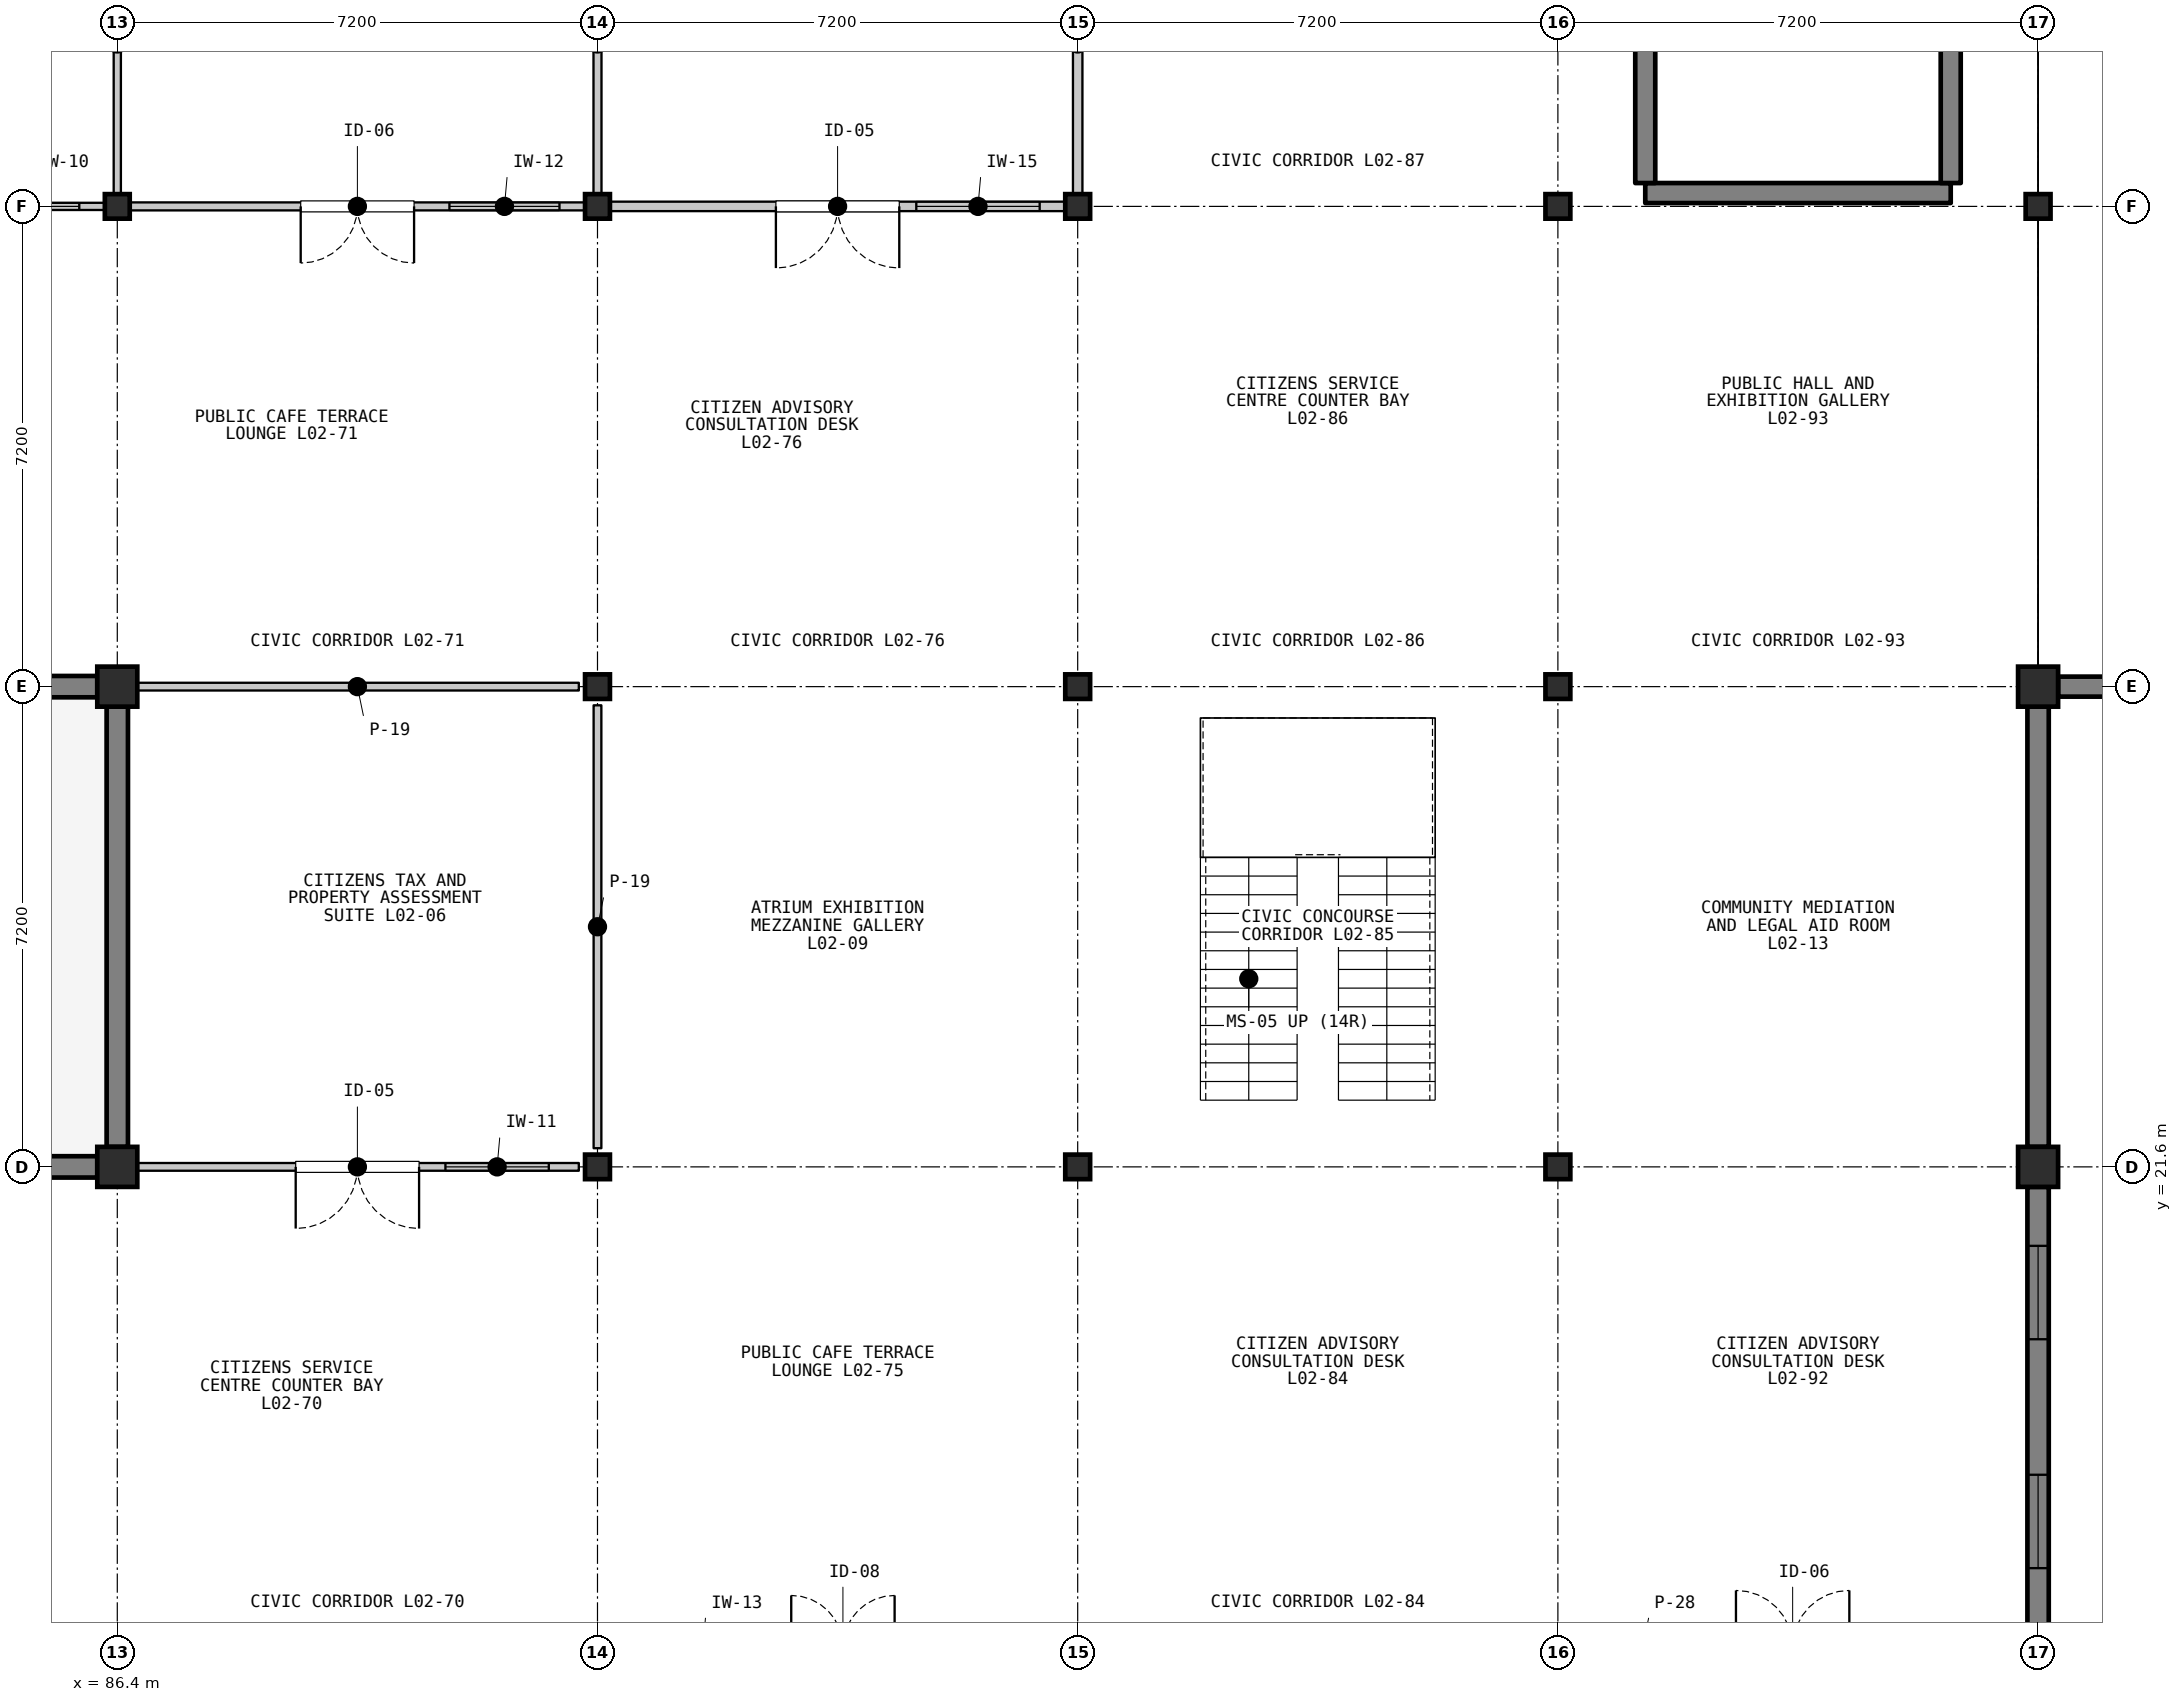
"""IFC4 building model, lengths in metres.
Left out: names, types, materials, properties, quantities, classifications, styles, units other than length and angle.
Written with IfcOpenShell. Run it as: python <this file> out.ifc"""

import sys

from ifc_helpers import new_model, si_unit, direction, frame, frame_2d, origin, origin_2d, place, context, subcontext, project, spatial, rectangle, i_section, extrude, element, fill, save


model = new_model("IFC4")
c1 = context("Model", 3, precision=1e-05, world=origin(), true_north=direction((0.0, 1.0)))
c2 = subcontext(c1, "Body", "Model", "MODEL_VIEW")
j1 = project(units=[si_unit("LENGTHUNIT", "METRE"), si_unit("PLANEANGLEUNIT", "RADIAN")], contexts=[c1])
p1 = place(None, origin())
s1 = spatial("IfcSite", under=j1, at=p1, CompositionType="ELEMENT")
p2 = place(p1, origin())
s2 = spatial("IfcBuilding", under=s1, at=p2, CompositionType="ELEMENT")
p3 = place(p2, frame((0.0, 0.0, 5.4)))
s3 = spatial("IfcBuildingStorey", under=s2, at=p3, CompositionType="ELEMENT", Elevation=5.4)
for number, where, z_axis, x_axis in (
    (1, (86.4, 21.6, 0.0), (0.0, 0.0, 1.0), (1.0, 0.0, 0.0)),
    (2, (86.4, 28.8, 0.0), (0.0, 0.0, 1.0), (1.0, 0.0, 0.0)),
):
    element("IfcColumn", number, at=place(p3, frame(where, z_axis=z_axis, x_axis=x_axis)), inside=s3, PredefinedType="COLUMN", context=c2, shape_type="SweptSolid", body=[
        extrude(rectangle(XDim=0.6, YDim=0.6, at=origin_2d()), origin(), (0.0, 0.0, 1.0), 4.5),
    ])
for number, where, z_axis, x_axis in (
    (3, (86.4, 36.0, 0.0), (0.0, 0.0, 1.0), (1.0, 0.0, 0.0)),
    (4, (93.6, 21.6, 0.0), (0.0, 0.0, 1.0), (1.0, 0.0, 0.0)),
    (5, (93.6, 28.8, 0.0), (0.0, 0.0, 1.0), (1.0, 0.0, 0.0)),
    (6, (93.6, 36.0, 0.0), (0.0, 0.0, 1.0), (1.0, 0.0, 0.0)),
    (7, (100.8, 21.6, 0.0), (0.0, 0.0, 1.0), (1.0, 0.0, 0.0)),
    (8, (100.8, 28.8, 0.0), (0.0, 0.0, 1.0), (1.0, 0.0, 0.0)),
    (9, (100.8, 36.0, 0.0), (0.0, 0.0, 1.0), (1.0, 0.0, 0.0)),
    (10, (108.0, 21.6, 0.0), (0.0, 0.0, 1.0), (1.0, 0.0, 0.0)),
    (11, (108.0, 28.8, 0.0), (0.0, 0.0, 1.0), (1.0, 0.0, 0.0)),
    (12, (108.0, 36.0, 0.0), (0.0, 0.0, 1.0), (1.0, 0.0, 0.0)),
):
    element("IfcColumn", number, at=place(p3, frame(where, z_axis=z_axis, x_axis=x_axis)), inside=s3, PredefinedType="COLUMN", context=c2, shape_type="SweptSolid", body=[
        extrude(i_section(OverallWidth=0.373, OverallDepth=0.368, WebThickness=0.015, FlangeThickness=0.024, FilletRadius=0.015, at=origin_2d()), origin(), (0.0, 0.0, 1.0), 4.5),
    ])
for number, where, z_axis, x_axis in (
    (13, (115.2, 21.6, 0.0), (0.0, 0.0, 1.0), (1.0, 0.0, 0.0)),
    (14, (115.2, 28.8, 0.0), (0.0, 0.0, 1.0), (1.0, 0.0, 0.0)),
):
    element("IfcColumn", number, at=place(p3, frame(where, z_axis=z_axis, x_axis=x_axis)), inside=s3, PredefinedType="COLUMN", context=c2, shape_type="SweptSolid", body=[
        extrude(rectangle(XDim=0.6, YDim=0.6, at=origin_2d()), origin(), (0.0, 0.0, 1.0), 4.5),
    ])
p4 = place(p3, frame((115.2, 36.0, 0.0), z_axis=(0.0, 0.0, 1.0), x_axis=(1.0, 0.0, 0.0)))
e15 = element("IfcColumn", 15, at=p4, inside=s3, PredefinedType="COLUMN", context=c2, shape_type="SweptSolid", body=[
    extrude(i_section(OverallWidth=0.373, OverallDepth=0.368, WebThickness=0.015, FlangeThickness=0.024, FilletRadius=0.015, at=origin_2d()), origin(), (0.0, 0.0, 1.0), 4.5),
])
for number, where, z_axis, x_axis in (
    (16, (79.5, 21.6, 0.0), (0.0, 0.0, 1.0), (1.0, 0.0, 0.0)),
    (17, (86.1, 28.8, 0.0), (0.0, 0.0, 1.0), (-1.0, 0.0, 0.0)),
):
    element("IfcWall", number, at=place(p3, frame(where, z_axis=z_axis, x_axis=x_axis)), inside=s3, PredefinedType="SOLIDWALL", context=c2, shape_type="SweptSolid", body=[
        extrude(rectangle(XDim=6.6, YDim=0.32, at=frame_2d((3.3, 0.0))), origin(), (0.0, 0.0, 1.0), 3.698),
    ])
p5 = place(p3, frame((86.4, 21.9, 0.0), z_axis=(0.0, 0.0, 1.0), x_axis=(0.0, 1.0, 0.0)))
e18 = element("IfcWall", 18, at=p5, inside=s3, PredefinedType="SOLIDWALL", context=c2, shape_type="SweptSolid", body=[
    extrude(rectangle(XDim=6.6, YDim=0.32, at=frame_2d((3.3, 0.0))), origin(), (0.0, 0.0, 1.0), 3.767),
])
p6 = place(p3, frame((115.2, 21.3, 0.0), z_axis=(0.0, 0.0, 1.0), x_axis=(0.0, -1.0, 0.0)))
e19 = element("IfcWall", 19, at=p6, inside=s3, PredefinedType="SOLIDWALL", context=c2, shape_type="SweptSolid", body=[
    extrude(rectangle(XDim=6.6, YDim=0.32, at=frame_2d((3.3, 0.0))), origin(), (0.0, 0.0, 1.0), 3.767),
])
p7 = place(p6, frame((0.884, 0.0, 0.95)))
e20 = element("IfcOpeningElement", 20, at=p7, cuts=e19, PredefinedType="OPENING", context=c2, shape_type="SweptSolid", body=[
    extrude(rectangle(XDim=1.4, YDim=2.1, at=frame_2d((0.7, 1.05))), frame((0.0, 0.17, 0.0), z_axis=(0.0, -1.0, 0.0), x_axis=(1.0, 0.0, 0.0)), (0.0, 0.0, 1.0), 0.34),
])
p8 = place(p6, frame((4.316, 0.0, 0.95)))
e21 = element("IfcOpeningElement", 21, at=p8, cuts=e19, PredefinedType="OPENING", context=c2, shape_type="SweptSolid", body=[
    extrude(rectangle(XDim=1.4, YDim=2.1, at=frame_2d((0.7, 1.05))), frame((0.0, 0.17, 0.0), z_axis=(0.0, -1.0, 0.0), x_axis=(1.0, 0.0, 0.0)), (0.0, 0.0, 1.0), 0.34),
])
p9 = place(p3, frame((115.2, 28.5, 0.0), z_axis=(0.0, 0.0, 1.0), x_axis=(0.0, -1.0, 0.0)))
e22 = element("IfcWall", 22, at=p9, inside=s3, PredefinedType="SOLIDWALL", context=c2, shape_type="SweptSolid", body=[
    extrude(rectangle(XDim=6.6, YDim=0.32, at=frame_2d((3.3, 0.0))), origin(), (0.0, 0.0, 1.0), 3.767),
])
p10 = place(p3, frame((122.15, 28.8, 0.0), z_axis=(0.0, 0.0, 1.0), x_axis=(-1.0, 0.0, 0.0)))
e23 = element("IfcWall", 23, at=p10, inside=s3, PredefinedType="SOLIDWALL", context=c2, shape_type="SweptSolid", body=[
    extrude(rectangle(XDim=6.65, YDim=0.3, at=frame_2d((3.325, 0.0))), origin(), (0.0, 0.0, 1.0), 3.698),
])
p11 = place(p10, frame((2.1, 0.0, 0.95)))
e24 = element("IfcOpeningElement", 24, at=p11, cuts=e23, PredefinedType="OPENING", context=c2, shape_type="SweptSolid", body=[
    extrude(rectangle(XDim=2.45, YDim=2.05, at=frame_2d((1.225, 1.025))), frame((0.0, 0.16, 0.0), z_axis=(0.0, -1.0, 0.0), x_axis=(1.0, 0.0, 0.0)), (0.0, 0.0, 1.0), 0.32),
])
p12 = place(p3, frame((109.31, 36.2, 0.0), z_axis=(0.0, 0.0, 1.0), x_axis=(1.0, 0.0, 0.0)))
e25 = element("IfcWall", 25, at=p12, inside=s3, PredefinedType="SHEAR", context=c2, shape_type="SweptSolid", body=[
    extrude(rectangle(XDim=4.58, YDim=0.3, at=frame_2d((2.29, 0.0))), origin(), (0.0, 0.0, 1.0), 4.3),
])
for number, where, z_axis, x_axis in (
    (26, (109.31, 36.35, 0.0), (0.0, 0.0, 1.0), (0.0, 1.0, 0.0)),
    (27, (113.89, 36.35, 0.0), (0.0, 0.0, 1.0), (0.0, 1.0, 0.0)),
):
    element("IfcWall", number, at=place(p3, frame(where, z_axis=z_axis, x_axis=x_axis)), inside=s3, PredefinedType="SHEAR", context=c2, shape_type="SweptSolid", body=[
        extrude(rectangle(XDim=9.3, YDim=0.3, at=frame_2d((4.65, 0.0))), origin(), (0.0, 0.0, 1.0), 4.3),
    ])
p13 = place(p3, frame((86.28, 36.0, 0.0), z_axis=(0.0, 0.0, 1.0), x_axis=(-1.0, 0.0, 0.0)))
e28 = element("IfcWall", 28, at=p13, inside=s3, PredefinedType="PARTITIONING", context=c2, shape_type="SweptSolid", body=[
    extrude(rectangle(XDim=6.96, YDim=0.108, at=frame_2d((3.48, 0.0))), origin(), (0.0, 0.0, 1.0), 3.688),
])
p14 = place(p13, frame((2.63, 0.0, 0.0)))
e29 = element("IfcOpeningElement", 29, at=p14, cuts=e28, PredefinedType="OPENING", context=c2, shape_type="SweptSolid", body=[
    extrude(rectangle(XDim=1.7, YDim=2.35, at=frame_2d((0.85, 1.175))), frame((0.0, 0.064, 0.0), z_axis=(0.0, -1.0, 0.0), x_axis=(1.0, 0.0, 0.0)), (0.0, 0.0, 1.0), 0.128),
])
p15 = place(p13, frame((0.45, 0.0, 1.05)))
e30 = element("IfcOpeningElement", 30, at=p15, cuts=e28, PredefinedType="OPENING", context=c2, shape_type="SweptSolid", body=[
    extrude(rectangle(XDim=1.5, YDim=1.15, at=frame_2d((0.75, 0.575))), frame((0.0, 0.064, 0.0), z_axis=(0.0, -1.0, 0.0), x_axis=(1.0, 0.0, 0.0)), (0.0, 0.0, 1.0), 0.128),
])
p16 = place(p3, frame((86.4, 42.92, 0.0), z_axis=(0.0, 0.0, 1.0), x_axis=(0.0, -1.0, 0.0)))
e31 = element("IfcWall", 31, at=p16, inside=s3, PredefinedType="PARTITIONING", context=c2, shape_type="SweptSolid", body=[
    extrude(rectangle(XDim=6.8, YDim=0.108, at=frame_2d((3.4, 0.0))), origin(), (0.0, 0.0, 1.0), 3.688),
])
p17 = place(p3, frame((93.32, 21.6, 0.0), z_axis=(0.0, 0.0, 1.0), x_axis=(-1.0, 0.0, 0.0)))
e32 = element("IfcWall", 32, at=p17, inside=s3, PredefinedType="PARTITIONING", context=c2, shape_type="SweptSolid", body=[
    extrude(rectangle(XDim=6.64, YDim=0.116, at=frame_2d((3.32, 0.0))), origin(), (0.0, 0.0, 1.0), 3.688),
])
p18 = place(p17, frame((2.395, 0.0, 0.0)))
e33 = element("IfcOpeningElement", 33, at=p18, cuts=e32, PredefinedType="OPENING", context=c2, shape_type="SweptSolid", body=[
    extrude(rectangle(XDim=1.85, YDim=2.45, at=frame_2d((0.925, 1.225))), frame((0.0, 0.068, 0.0), z_axis=(0.0, -1.0, 0.0), x_axis=(1.0, 0.0, 0.0)), (0.0, 0.0, 1.0), 0.136),
])
p19 = place(p17, frame((0.45, 0.0, 1.05)))
e34 = element("IfcOpeningElement", 34, at=p19, cuts=e32, PredefinedType="OPENING", context=c2, shape_type="SweptSolid", body=[
    extrude(rectangle(XDim=1.55, YDim=1.15, at=frame_2d((0.775, 0.575))), frame((0.0, 0.068, 0.0), z_axis=(0.0, -1.0, 0.0), x_axis=(1.0, 0.0, 0.0)), (0.0, 0.0, 1.0), 0.136),
])
p20 = place(p3, frame((86.68, 28.8, 0.0), z_axis=(0.0, 0.0, 1.0), x_axis=(1.0, 0.0, 0.0)))
e35 = element("IfcWall", 35, at=p20, inside=s3, PredefinedType="PARTITIONING", context=c2, shape_type="SweptSolid", body=[
    extrude(rectangle(XDim=6.64, YDim=0.116, at=frame_2d((3.32, 0.0))), origin(), (0.0, 0.0, 1.0), 3.688),
])
p21 = place(p3, frame((93.6, 28.52, 0.0), z_axis=(0.0, 0.0, 1.0), x_axis=(0.0, -1.0, 0.0)))
e36 = element("IfcWall", 36, at=p21, inside=s3, PredefinedType="PARTITIONING", context=c2, shape_type="SweptSolid", body=[
    extrude(rectangle(XDim=6.64, YDim=0.116, at=frame_2d((3.32, 0.0))), origin(), (0.0, 0.0, 1.0), 3.757),
])
p22 = place(p3, frame((93.48, 36.0, 0.0), z_axis=(0.0, 0.0, 1.0), x_axis=(-1.0, 0.0, 0.0)))
e37 = element("IfcWall", 37, at=p22, inside=s3, PredefinedType="PARTITIONING", context=c2, shape_type="SweptSolid", body=[
    extrude(rectangle(XDim=6.96, YDim=0.12, at=frame_2d((3.48, 0.0))), origin(), (0.0, 0.0, 1.0), 3.688),
])
p23 = place(p22, frame((2.63, 0.0, 0.0)))
e38 = element("IfcOpeningElement", 38, at=p23, cuts=e37, PredefinedType="OPENING", context=c2, shape_type="SweptSolid", body=[
    extrude(rectangle(XDim=1.7, YDim=2.35, at=frame_2d((0.85, 1.175))), frame((0.0, 0.07, 0.0), z_axis=(0.0, -1.0, 0.0), x_axis=(1.0, 0.0, 0.0)), (0.0, 0.0, 1.0), 0.14),
])
p24 = place(p22, frame((0.45, 0.0, 1.05)))
e39 = element("IfcOpeningElement", 39, at=p24, cuts=e37, PredefinedType="OPENING", context=c2, shape_type="SweptSolid", body=[
    extrude(rectangle(XDim=1.65, YDim=1.15, at=frame_2d((0.825, 0.575))), frame((0.0, 0.07, 0.0), z_axis=(0.0, -1.0, 0.0), x_axis=(1.0, 0.0, 0.0)), (0.0, 0.0, 1.0), 0.14),
])
p25 = place(p3, frame((93.6, 42.92, 0.0), z_axis=(0.0, 0.0, 1.0), x_axis=(0.0, -1.0, 0.0)))
e40 = element("IfcWall", 40, at=p25, inside=s3, PredefinedType="PARTITIONING", context=c2, shape_type="SweptSolid", body=[
    extrude(rectangle(XDim=6.8, YDim=0.12, at=frame_2d((3.4, 0.0))), origin(), (0.0, 0.0, 1.0), 3.688),
])
p26 = place(p3, frame((100.68, 36.0, 0.0), z_axis=(0.0, 0.0, 1.0), x_axis=(-1.0, 0.0, 0.0)))
e41 = element("IfcWall", 41, at=p26, inside=s3, PredefinedType="PARTITIONING", context=c2, shape_type="SweptSolid", body=[
    extrude(rectangle(XDim=6.96, YDim=0.142, at=frame_2d((3.48, 0.0))), origin(), (0.0, 0.0, 1.0), 3.688),
])
p27 = place(p26, frame((2.555, 0.0, 0.0)))
e42 = element("IfcOpeningElement", 42, at=p27, cuts=e41, PredefinedType="OPENING", context=c2, shape_type="SweptSolid", body=[
    extrude(rectangle(XDim=1.85, YDim=2.45, at=frame_2d((0.925, 1.225))), frame((0.0, 0.081, 0.0), z_axis=(0.0, -1.0, 0.0), x_axis=(1.0, 0.0, 0.0)), (0.0, 0.0, 1.0), 0.162),
])
p28 = place(p26, frame((0.45, 0.0, 1.05)))
e43 = element("IfcOpeningElement", 43, at=p28, cuts=e41, PredefinedType="OPENING", context=c2, shape_type="SweptSolid", body=[
    extrude(rectangle(XDim=1.85, YDim=1.18, at=frame_2d((0.925, 0.59))), frame((0.0, 0.081, 0.0), z_axis=(0.0, -1.0, 0.0), x_axis=(1.0, 0.0, 0.0)), (0.0, 0.0, 1.0), 0.162),
])
p29 = place(p3, frame((100.8, 43.08, 0.0), z_axis=(0.0, 0.0, 1.0), x_axis=(0.0, -1.0, 0.0)))
e44 = element("IfcWall", 44, at=p29, inside=s3, PredefinedType="PARTITIONING", context=c2, shape_type="SweptSolid", body=[
    extrude(rectangle(XDim=6.96, YDim=0.142, at=frame_2d((3.48, 0.0))), origin(), (0.0, 0.0, 1.0), 3.688),
])
p30 = place(p7, origin())
e45 = element("IfcWindow", 45, at=p30, inside=s3, PartitioningType="SINGLE_PANEL", PredefinedType="WINDOW", context=c2, shape_type="SweptSolid", body=[
    extrude(rectangle(XDim=1.4, YDim=2.1, at=frame_2d((0.7, 1.05))), frame((0.0, 0.03, 0.0), z_axis=(0.0, -1.0, 0.0), x_axis=(1.0, 0.0, 0.0)), (0.0, 0.0, 1.0), 0.06),
])
fill(e20, e45)
p31 = place(p8, origin())
e46 = element("IfcWindow", 46, at=p31, inside=s3, PartitioningType="SINGLE_PANEL", PredefinedType="WINDOW", context=c2, shape_type="SweptSolid", body=[
    extrude(rectangle(XDim=1.4, YDim=2.1, at=frame_2d((0.7, 1.05))), frame((0.0, 0.03, 0.0), z_axis=(0.0, -1.0, 0.0), x_axis=(1.0, 0.0, 0.0)), (0.0, 0.0, 1.0), 0.06),
])
fill(e21, e46)
p32 = place(p15, origin())
e47 = element("IfcWindow", 47, at=p32, inside=s3, PartitioningType="SINGLE_PANEL", PredefinedType="WINDOW", context=c2, shape_type="SweptSolid", body=[
    extrude(rectangle(XDim=1.5, YDim=1.15, at=frame_2d((0.75, 0.575))), frame((0.0, 0.03, 0.0), z_axis=(0.0, -1.0, 0.0), x_axis=(1.0, 0.0, 0.0)), (0.0, 0.0, 1.0), 0.06),
])
fill(e30, e47)
p33 = place(p18, origin())
e48 = element("IfcDoor", 48, at=p33, inside=s3, OperationType="DOUBLE_DOOR_SINGLE_SWING", PredefinedType="DOOR", context=c2, shape_type="SweptSolid", body=[
    extrude(rectangle(XDim=1.85, YDim=2.45, at=frame_2d((0.925, 1.225))), frame((0.0, 0.025, 0.0), z_axis=(0.0, -1.0, 0.0), x_axis=(1.0, 0.0, 0.0)), (0.0, 0.0, 1.0), 0.05),
])
fill(e33, e48)
p34 = place(p19, origin())
e49 = element("IfcWindow", 49, at=p34, inside=s3, PartitioningType="SINGLE_PANEL", PredefinedType="WINDOW", context=c2, shape_type="SweptSolid", body=[
    extrude(rectangle(XDim=1.55, YDim=1.15, at=frame_2d((0.775, 0.575))), frame((0.0, 0.03, 0.0), z_axis=(0.0, -1.0, 0.0), x_axis=(1.0, 0.0, 0.0)), (0.0, 0.0, 1.0), 0.06),
])
fill(e34, e49)
p35 = place(p23, origin())
e50 = element("IfcDoor", 50, at=p35, inside=s3, OperationType="DOUBLE_DOOR_SINGLE_SWING", PredefinedType="DOOR", context=c2, shape_type="SweptSolid", body=[
    extrude(rectangle(XDim=1.7, YDim=2.35, at=frame_2d((0.85, 1.175))), frame((0.0, 0.025, 0.0), z_axis=(0.0, -1.0, 0.0), x_axis=(1.0, 0.0, 0.0)), (0.0, 0.0, 1.0), 0.05),
])
fill(e38, e50)
p36 = place(p24, origin())
e51 = element("IfcWindow", 51, at=p36, inside=s3, PartitioningType="SINGLE_PANEL", PredefinedType="WINDOW", context=c2, shape_type="SweptSolid", body=[
    extrude(rectangle(XDim=1.65, YDim=1.15, at=frame_2d((0.825, 0.575))), frame((0.0, 0.03, 0.0), z_axis=(0.0, -1.0, 0.0), x_axis=(1.0, 0.0, 0.0)), (0.0, 0.0, 1.0), 0.06),
])
fill(e39, e51)
p37 = place(p27, origin())
e52 = element("IfcDoor", 52, at=p37, inside=s3, OperationType="DOUBLE_DOOR_SINGLE_SWING", PredefinedType="DOOR", context=c2, shape_type="SweptSolid", body=[
    extrude(rectangle(XDim=1.85, YDim=2.45, at=frame_2d((0.925, 1.225))), frame((0.0, 0.025, 0.0), z_axis=(0.0, -1.0, 0.0), x_axis=(1.0, 0.0, 0.0)), (0.0, 0.0, 1.0), 0.05),
])
fill(e42, e52)
p38 = place(p28, origin())
e53 = element("IfcWindow", 53, at=p38, inside=s3, PartitioningType="SINGLE_PANEL", PredefinedType="WINDOW", context=c2, shape_type="SweptSolid", body=[
    extrude(rectangle(XDim=1.85, YDim=1.18, at=frame_2d((0.925, 0.59))), frame((0.0, 0.03, 0.0), z_axis=(0.0, -1.0, 0.0), x_axis=(1.0, 0.0, 0.0)), (0.0, 0.0, 1.0), 0.06),
])
fill(e43, e53)
save(model, sys.argv[1])
